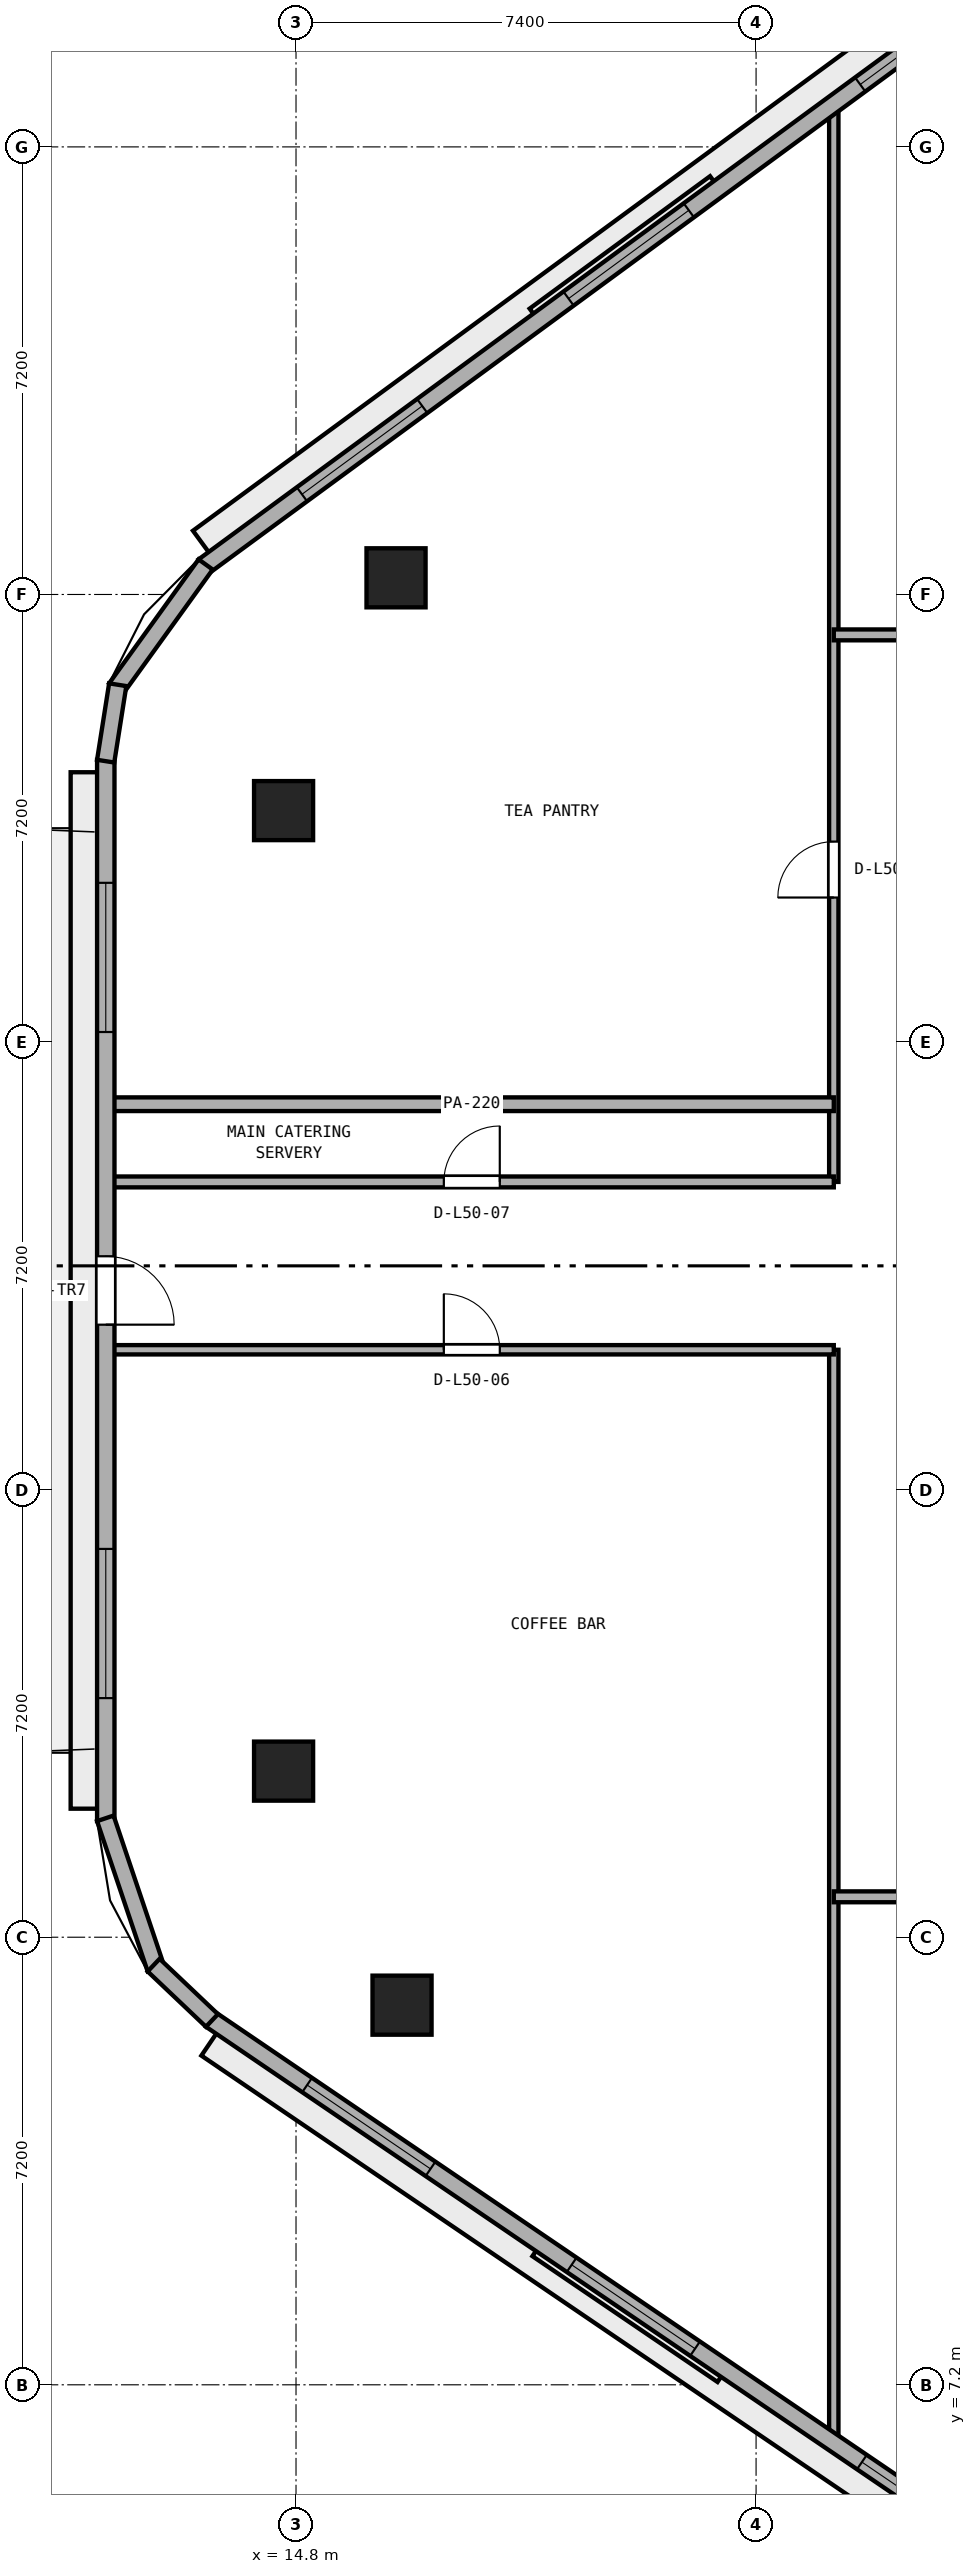
"""IFC4 building model, lengths in metres.
Left out: names, types, materials, properties, quantities, classifications, styles, units other than length and angle.
Written with IfcOpenShell. Run it as: python <this file> out.ifc"""

import sys

from ifc_helpers import new_model, si_unit, direction, frame, frame_2d, origin, origin_2d, place, context, subcontext, project, spatial, rectangle, extrude, element, fill, save


model = new_model("IFC4")
c1 = context("Model", 3, precision=1e-05, world=origin(), true_north=direction((0.0, 1.0)))
c2 = subcontext(c1, "Body", "Model", "MODEL_VIEW")
j1 = project(units=[si_unit("LENGTHUNIT", "METRE"), si_unit("PLANEANGLEUNIT", "RADIAN")], contexts=[c1])
p1 = place(None, origin())
s1 = spatial("IfcSite", under=j1, at=p1, CompositionType="ELEMENT")
p2 = place(p1, origin())
s2 = spatial("IfcBuilding", under=s1, at=p2, CompositionType="ELEMENT")
p3 = place(p2, frame((0.0, 0.0, 197.2)))
s3 = spatial("IfcBuildingStorey", under=s2, at=p3, CompositionType="ELEMENT", Elevation=197.2)
for number, where, z_axis, x_axis in (
    (1, (16.409, 36.268, 0.0), (0.0, 0.0, 1.0), (1.0, 0.0, 0.0)),
    (2, (14.6, 32.523, 0.0), (0.0, 0.0, 1.0), (1.0, 0.0, 0.0)),
    (3, (14.6, 17.072, 0.0), (0.0, 0.0, 1.0), (1.0, 0.0, 0.0)),
    (4, (16.505, 13.307, 0.0), (0.0, 0.0, 1.0), (1.0, 0.0, 0.0)),
):
    element("IfcColumn", number, at=place(p3, frame(where, z_axis=z_axis, x_axis=x_axis)), inside=s3, PredefinedType="COLUMN", context=c2, shape_type="SweptSolid", body=[
        extrude(rectangle(XDim=0.95, YDim=0.95, at=origin_2d()), origin(), (0.0, 0.0, 1.0), 3.8),
    ])
p4 = place(p3, frame((23.45, 6.235, 0.0), z_axis=(0.0, 0.0, 1.0), x_axis=(0.0, 1.0, 0.0)))
e5 = element("IfcWall", 5, at=p4, inside=s3, PredefinedType="PARTITIONING", context=c2, shape_type="SweptSolid", body=[
    extrude(rectangle(XDim=17.615, YDim=0.15, at=frame_2d((8.808, 0.0))), origin(), (0.0, 0.0, 1.0), 3.54),
])
p5 = place(p3, frame((23.45, 26.55, 0.0), z_axis=(0.0, 0.0, 1.0), x_axis=(0.0, 1.0, 0.0)))
e6 = element("IfcWall", 6, at=p5, inside=s3, PredefinedType="PARTITIONING", context=c2, shape_type="SweptSolid", body=[
    extrude(rectangle(XDim=17.375, YDim=0.15, at=frame_2d((8.688, 0.0))), origin(), (0.0, 0.0, 1.0), 3.54),
])
p6 = place(p5, frame((4.575, 0.0, 0.0)))
e7 = element("IfcOpeningElement", 7, at=p6, cuts=e6, PredefinedType="OPENING", context=c2, shape_type="SweptSolid", body=[
    extrude(rectangle(XDim=0.9, YDim=2.1, at=frame_2d((0.45, 1.05))), frame((0.0, 0.085, 0.0), z_axis=(0.0, -1.0, 0.0), x_axis=(1.0, 0.0, 0.0)), (0.0, 0.0, 1.0), 0.17),
])
p7 = place(p3, frame((23.45, 15.05, 0.0), z_axis=(0.0, 0.0, 1.0), x_axis=(1.0, 0.0, 0.0)))
e8 = element("IfcWall", 8, at=p7, inside=s3, PredefinedType="PARTITIONING", context=c2, shape_type="SweptSolid", body=[
    extrude(rectangle(XDim=27.1, YDim=0.175, at=frame_2d((13.55, 0.0))), origin(), (0.0, 0.0, 1.0), 3.54),
])
p8 = place(p7, frame((3.895, 0.0, 0.0)))
e9 = element("IfcOpeningElement", 9, at=p8, cuts=e8, PredefinedType="OPENING", context=c2, shape_type="SweptSolid", body=[
    extrude(rectangle(XDim=0.9, YDim=2.1, at=frame_2d((0.45, 1.05))), frame((0.0, 0.097, 0.0), z_axis=(0.0, -1.0, 0.0), x_axis=(1.0, 0.0, 0.0)), (0.0, 0.0, 1.0), 0.195),
])
p9 = place(p7, frame((13.75, 0.0, 0.0)))
e10 = element("IfcOpeningElement", 10, at=p9, cuts=e8, PredefinedType="OPENING", context=c2, shape_type="SweptSolid", body=[
    extrude(rectangle(XDim=0.9, YDim=2.1, at=frame_2d((0.45, 1.05))), frame((0.0, 0.097, 0.0), z_axis=(0.0, -1.0, 0.0), x_axis=(1.0, 0.0, 0.0)), (0.0, 0.0, 1.0), 0.195),
])
p10 = place(p7, frame((22.955, 0.0, 0.0)))
e11 = element("IfcOpeningElement", 11, at=p10, cuts=e8, PredefinedType="OPENING", context=c2, shape_type="SweptSolid", body=[
    extrude(rectangle(XDim=0.9, YDim=2.1, at=frame_2d((0.45, 1.05))), frame((0.0, 0.097, 0.0), z_axis=(0.0, -1.0, 0.0), x_axis=(1.0, 0.0, 0.0)), (0.0, 0.0, 1.0), 0.195),
])
p11 = place(p3, frame((11.805, 23.85, 0.0), z_axis=(0.0, 0.0, 1.0), x_axis=(1.0, 0.0, 0.0)))
e12 = element("IfcWall", 12, at=p11, inside=s3, PredefinedType="PARTITIONING", context=c2, shape_type="SweptSolid", body=[
    extrude(rectangle(XDim=11.645, YDim=0.15, at=frame_2d((5.823, 0.0))), origin(), (0.0, 0.0, 1.0), 3.54),
])
p12 = place(p11, frame((5.373, 0.0, 0.0)))
e13 = element("IfcOpeningElement", 13, at=p12, cuts=e12, PredefinedType="OPENING", context=c2, shape_type="SweptSolid", body=[
    extrude(rectangle(XDim=0.9, YDim=2.1, at=frame_2d((0.45, 1.05))), frame((0.0, 0.085, 0.0), z_axis=(0.0, -1.0, 0.0), x_axis=(1.0, 0.0, 0.0)), (0.0, 0.0, 1.0), 0.17),
])
p13 = place(p3, frame((11.805, 26.55, 0.0), z_axis=(0.0, 0.0, 1.0), x_axis=(1.0, 0.0, 0.0)))
e14 = element("IfcWall", 14, at=p13, inside=s3, PredefinedType="PARTITIONING", context=c2, shape_type="SweptSolid", body=[
    extrude(rectangle(XDim=11.645, YDim=0.175, at=frame_2d((5.823, 0.0))), origin(), (0.0, 0.0, 1.0), 3.54),
])
p14 = place(p13, frame((5.373, 0.0, 0.0)))
e15 = element("IfcOpeningElement", 15, at=p14, cuts=e14, PredefinedType="OPENING", context=c2, shape_type="SweptSolid", body=[
    extrude(rectangle(XDim=0.9, YDim=2.1, at=frame_2d((0.45, 1.05))), frame((0.0, 0.097, 0.0), z_axis=(0.0, -1.0, 0.0), x_axis=(1.0, 0.0, 0.0)), (0.0, 0.0, 1.0), 0.195),
])
p15 = place(p3, frame((11.805, 27.8, 0.0), z_axis=(0.0, 0.0, 1.0), x_axis=(1.0, 0.0, 0.0)))
e16 = element("IfcWall", 16, at=p15, inside=s3, PredefinedType="PARTITIONING", context=c2, shape_type="SweptSolid", body=[
    extrude(rectangle(XDim=11.645, YDim=0.22, at=frame_2d((5.823, 0.0))), origin(), (0.0, 0.0, 1.0), 3.54),
])
p16 = place(p3, frame((23.45, 35.35, 0.0), z_axis=(0.0, 0.0, 1.0), x_axis=(1.0, 0.0, 0.0)))
e17 = element("IfcWall", 17, at=p16, inside=s3, PredefinedType="PARTITIONING", context=c2, shape_type="SweptSolid", body=[
    extrude(rectangle(XDim=10.95, YDim=0.175, at=frame_2d((5.475, 0.0))), origin(), (0.0, 0.0, 1.0), 3.54),
])
p17 = place(p16, frame((3.295, 0.0, 0.0)))
e18 = element("IfcOpeningElement", 18, at=p17, cuts=e17, PredefinedType="OPENING", context=c2, shape_type="SweptSolid", body=[
    extrude(rectangle(XDim=1.0, YDim=2.12, at=frame_2d((0.5, 1.06))), frame((0.0, 0.097, 0.0), z_axis=(0.0, -1.0, 0.0), x_axis=(1.0, 0.0, 0.0)), (0.0, 0.0, 1.0), 0.195),
])
p18 = place(p16, frame((8.53, 0.0, 0.0)))
e19 = element("IfcOpeningElement", 19, at=p18, cuts=e17, PredefinedType="OPENING", context=c2, shape_type="SweptSolid", body=[
    extrude(rectangle(XDim=1.0, YDim=2.12, at=frame_2d((0.5, 1.06))), frame((0.0, 0.097, 0.0), z_axis=(0.0, -1.0, 0.0), x_axis=(1.0, 0.0, 0.0)), (0.0, 0.0, 1.0), 0.195),
])
p19 = place(p3, frame((26.986, 46.488, 0.0), z_axis=(0.0, 0.0, 1.0), x_axis=(-0.806097783211, -0.59178236194, 0.0)))
e20 = element("IfcWall", 20, at=p19, inside=s3, PredefinedType="STANDARD", context=c2, shape_type="SweptSolid", body=[
    extrude(rectangle(XDim=16.959, YDim=0.28, at=frame_2d((8.479, 0.0))), origin(), (0.0, 0.0, 1.0), 3.54),
])
p20 = place(p19, frame((1.46, 0.0, 0.9)))
e21 = element("IfcOpeningElement", 21, at=p20, cuts=e20, PredefinedType="OPENING", context=c2, shape_type="SweptSolid", body=[
    extrude(rectangle(XDim=2.4, YDim=1.75, at=frame_2d((1.2, 0.875))), frame((0.0, 0.15, 0.0), z_axis=(0.0, -1.0, 0.0), x_axis=(1.0, 0.0, 0.0)), (0.0, 0.0, 1.0), 0.3),
])
p21 = place(p19, frame((7.279, 0.0, 0.9)))
e22 = element("IfcOpeningElement", 22, at=p21, cuts=e20, PredefinedType="OPENING", context=c2, shape_type="SweptSolid", body=[
    extrude(rectangle(XDim=2.4, YDim=1.75, at=frame_2d((1.2, 0.875))), frame((0.0, 0.15, 0.0), z_axis=(0.0, -1.0, 0.0), x_axis=(1.0, 0.0, 0.0)), (0.0, 0.0, 1.0), 0.3),
])
p22 = place(p19, frame((12.599, 0.0, 0.9)))
e23 = element("IfcOpeningElement", 23, at=p22, cuts=e20, PredefinedType="OPENING", context=c2, shape_type="SweptSolid", body=[
    extrude(rectangle(XDim=2.4, YDim=1.75, at=frame_2d((1.2, 0.875))), frame((0.0, 0.15, 0.0), z_axis=(0.0, -1.0, 0.0), x_axis=(1.0, 0.0, 0.0)), (0.0, 0.0, 1.0), 0.3),
])
p23 = place(p3, frame((11.74, 33.34, 0.0), z_axis=(0.0, 0.0, 1.0), x_axis=(0.0, -1.0, 0.0)))
e24 = element("IfcWall", 24, at=p23, inside=s3, PredefinedType="STANDARD", context=c2, shape_type="SweptSolid", body=[
    extrude(rectangle(XDim=17.073, YDim=0.28, at=frame_2d((8.536, 0.0))), origin(), (0.0, 0.0, 1.0), 3.54),
])
p24 = place(p23, frame((7.986, 0.0, 0.0)))
e25 = element("IfcOpeningElement", 25, at=p24, cuts=e24, PredefinedType="OPENING", context=c2, shape_type="SweptSolid", body=[
    extrude(rectangle(XDim=1.1, YDim=2.2, at=frame_2d((0.55, 1.1))), frame((0.0, 0.15, 0.0), z_axis=(0.0, -1.0, 0.0), x_axis=(1.0, 0.0, 0.0)), (0.0, 0.0, 1.0), 0.3),
])
p25 = place(p23, frame((1.979, 0.0, 0.9)))
e26 = element("IfcOpeningElement", 26, at=p25, cuts=e24, PredefinedType="OPENING", context=c2, shape_type="SweptSolid", body=[
    extrude(rectangle(XDim=2.4, YDim=1.75, at=frame_2d((1.2, 0.875))), frame((0.0, 0.15, 0.0), z_axis=(0.0, -1.0, 0.0), x_axis=(1.0, 0.0, 0.0)), (0.0, 0.0, 1.0), 0.3),
])
p26 = place(p23, frame((12.694, 0.0, 0.9)))
e27 = element("IfcOpeningElement", 27, at=p26, cuts=e24, PredefinedType="OPENING", context=c2, shape_type="SweptSolid", body=[
    extrude(rectangle(XDim=2.4, YDim=1.75, at=frame_2d((1.2, 0.875))), frame((0.0, 0.15, 0.0), z_axis=(0.0, -1.0, 0.0), x_axis=(1.0, 0.0, 0.0)), (0.0, 0.0, 1.0), 0.3),
])
p27 = place(p3, frame((13.43, 13.075, 0.0), z_axis=(0.0, 0.0, 1.0), x_axis=(0.827025402003, -0.562164552815, 0.0)))
e28 = element("IfcWall", 28, at=p27, inside=s3, PredefinedType="STANDARD", context=c2, shape_type="SweptSolid", body=[
    extrude(rectangle(XDim=16.435, YDim=0.28, at=frame_2d((8.218, 0.0))), origin(), (0.0, 0.0, 1.0), 3.54),
])
p28 = place(p27, frame((1.873, 0.0, 0.9)))
e29 = element("IfcOpeningElement", 29, at=p28, cuts=e28, PredefinedType="OPENING", context=c2, shape_type="SweptSolid", body=[
    extrude(rectangle(XDim=2.4, YDim=1.75, at=frame_2d((1.2, 0.875))), frame((0.0, 0.15, 0.0), z_axis=(0.0, -1.0, 0.0), x_axis=(1.0, 0.0, 0.0)), (0.0, 0.0, 1.0), 0.3),
])
p29 = place(p27, frame((7.018, 0.0, 0.9)))
e30 = element("IfcOpeningElement", 30, at=p29, cuts=e28, PredefinedType="OPENING", context=c2, shape_type="SweptSolid", body=[
    extrude(rectangle(XDim=2.4, YDim=1.75, at=frame_2d((1.2, 0.875))), frame((0.0, 0.15, 0.0), z_axis=(0.0, -1.0, 0.0), x_axis=(1.0, 0.0, 0.0)), (0.0, 0.0, 1.0), 0.3),
])
p30 = place(p27, frame((12.663, 0.0, 0.9)))
e31 = element("IfcOpeningElement", 31, at=p30, cuts=e28, PredefinedType="OPENING", context=c2, shape_type="SweptSolid", body=[
    extrude(rectangle(XDim=2.4, YDim=1.75, at=frame_2d((1.2, 0.875))), frame((0.0, 0.15, 0.0), z_axis=(0.0, -1.0, 0.0), x_axis=(1.0, 0.0, 0.0)), (0.0, 0.0, 1.0), 0.3),
])
p31 = place(p3, frame((13.346, 36.483, 0.0), z_axis=(0.0, 0.0, 1.0), x_axis=(-0.585128091556, -0.810940883463, 0.0)))
e32 = element("IfcWall", 32, at=p31, inside=s3, PredefinedType="STANDARD", context=c2, shape_type="SweptSolid", body=[
    extrude(rectangle(XDim=2.46, YDim=0.28, at=frame_2d((1.23, 0.0))), origin(), (0.0, 0.0, 1.0), 3.54),
])
p32 = place(p3, frame((11.932, 34.548, 0.0), z_axis=(0.0, 0.0, 1.0), x_axis=(-0.155519443181, -0.987832831401, 0.0)))
e33 = element("IfcWall", 33, at=p32, inside=s3, PredefinedType="STANDARD", context=c2, shape_type="SweptSolid", body=[
    extrude(rectangle(XDim=1.245, YDim=0.28, at=frame_2d((0.623, 0.0))), origin(), (0.0, 0.0, 1.0), 3.54),
])
p33 = place(p3, frame((11.733, 16.312, 0.0), z_axis=(0.0, 0.0, 1.0), x_axis=(0.318924860995, -0.947780002447, 0.0)))
e34 = element("IfcWall", 34, at=p33, inside=s3, PredefinedType="STANDARD", context=c2, shape_type="SweptSolid", body=[
    extrude(rectangle(XDim=2.552, YDim=0.28, at=frame_2d((1.276, 0.0))), origin(), (0.0, 0.0, 1.0), 3.54),
])
p34 = place(p3, frame((12.51, 13.951, 0.0), z_axis=(0.0, 0.0, 1.0), x_axis=(0.725371815671, -0.688357268451, 0.0)))
e35 = element("IfcWall", 35, at=p34, inside=s3, PredefinedType="STANDARD", context=c2, shape_type="SweptSolid", body=[
    extrude(rectangle(XDim=1.293, YDim=0.28, at=frame_2d((0.646, 0.0))), origin(), (0.0, 0.0, 1.0), 3.54),
])
p35 = place(p12, origin())
e36 = element("IfcDoor", 36, at=p35, inside=s3, OperationType="SINGLE_SWING_LEFT", PredefinedType="DOOR", context=c2, shape_type="SweptSolid", body=[
    extrude(rectangle(XDim=0.9, YDim=2.1, at=frame_2d((0.45, 1.05))), frame((0.0, 0.025, 0.0), z_axis=(0.0, -1.0, 0.0), x_axis=(1.0, 0.0, 0.0)), (0.0, 0.0, 1.0), 0.05),
])
fill(e13, e36)
p36 = place(p14, origin())
e37 = element("IfcDoor", 37, at=p36, inside=s3, OperationType="SINGLE_SWING_RIGHT", PredefinedType="DOOR", context=c2, shape_type="SweptSolid", body=[
    extrude(rectangle(XDim=0.9, YDim=2.1, at=frame_2d((0.45, 1.05))), frame((0.0, 0.025, 0.0), z_axis=(0.0, -1.0, 0.0), x_axis=(1.0, 0.0, 0.0)), (0.0, 0.0, 1.0), 0.05),
])
fill(e15, e37)
p37 = place(p6, origin())
e38 = element("IfcDoor", 38, at=p37, inside=s3, OperationType="SINGLE_SWING_LEFT", PredefinedType="DOOR", context=c2, shape_type="SweptSolid", body=[
    extrude(rectangle(XDim=0.9, YDim=2.1, at=frame_2d((0.45, 1.05))), frame((0.0, 0.025, 0.0), z_axis=(0.0, -1.0, 0.0), x_axis=(1.0, 0.0, 0.0)), (0.0, 0.0, 1.0), 0.05),
])
fill(e7, e38)
p38 = place(p20, origin())
e39 = element("IfcWindow", 39, at=p38, inside=s3, PartitioningType="SINGLE_PANEL", PredefinedType="WINDOW", context=c2, shape_type="SweptSolid", body=[
    extrude(rectangle(XDim=2.4, YDim=1.75, at=frame_2d((1.2, 0.875))), frame((0.0, 0.03, 0.0), z_axis=(0.0, -1.0, 0.0), x_axis=(1.0, 0.0, 0.0)), (0.0, 0.0, 1.0), 0.06),
])
fill(e21, e39)
p39 = place(p21, origin())
e40 = element("IfcWindow", 40, at=p39, inside=s3, PartitioningType="SINGLE_PANEL", PredefinedType="WINDOW", context=c2, shape_type="SweptSolid", body=[
    extrude(rectangle(XDim=2.4, YDim=1.75, at=frame_2d((1.2, 0.875))), frame((0.0, 0.03, 0.0), z_axis=(0.0, -1.0, 0.0), x_axis=(1.0, 0.0, 0.0)), (0.0, 0.0, 1.0), 0.06),
])
fill(e22, e40)
p40 = place(p22, origin())
e41 = element("IfcWindow", 41, at=p40, inside=s3, PartitioningType="SINGLE_PANEL", PredefinedType="WINDOW", context=c2, shape_type="SweptSolid", body=[
    extrude(rectangle(XDim=2.4, YDim=1.75, at=frame_2d((1.2, 0.875))), frame((0.0, 0.03, 0.0), z_axis=(0.0, -1.0, 0.0), x_axis=(1.0, 0.0, 0.0)), (0.0, 0.0, 1.0), 0.06),
])
fill(e23, e41)
p41 = place(p24, origin())
e42 = element("IfcDoor", 42, at=p41, inside=s3, OperationType="SINGLE_SWING_RIGHT", PredefinedType="DOOR", context=c2, shape_type="SweptSolid", body=[
    extrude(rectangle(XDim=1.1, YDim=2.2, at=frame_2d((0.55, 1.1))), frame((0.0, 0.025, 0.0), z_axis=(0.0, -1.0, 0.0), x_axis=(1.0, 0.0, 0.0)), (0.0, 0.0, 1.0), 0.05),
])
fill(e25, e42)
p42 = place(p25, origin())
e43 = element("IfcWindow", 43, at=p42, inside=s3, PartitioningType="SINGLE_PANEL", PredefinedType="WINDOW", context=c2, shape_type="SweptSolid", body=[
    extrude(rectangle(XDim=2.4, YDim=1.75, at=frame_2d((1.2, 0.875))), frame((0.0, 0.03, 0.0), z_axis=(0.0, -1.0, 0.0), x_axis=(1.0, 0.0, 0.0)), (0.0, 0.0, 1.0), 0.06),
])
fill(e26, e43)
p43 = place(p26, origin())
e44 = element("IfcWindow", 44, at=p43, inside=s3, PartitioningType="SINGLE_PANEL", PredefinedType="WINDOW", context=c2, shape_type="SweptSolid", body=[
    extrude(rectangle(XDim=2.4, YDim=1.75, at=frame_2d((1.2, 0.875))), frame((0.0, 0.03, 0.0), z_axis=(0.0, -1.0, 0.0), x_axis=(1.0, 0.0, 0.0)), (0.0, 0.0, 1.0), 0.06),
])
fill(e27, e44)
p44 = place(p28, origin())
e45 = element("IfcWindow", 45, at=p44, inside=s3, PartitioningType="SINGLE_PANEL", PredefinedType="WINDOW", context=c2, shape_type="SweptSolid", body=[
    extrude(rectangle(XDim=2.4, YDim=1.75, at=frame_2d((1.2, 0.875))), frame((0.0, 0.03, 0.0), z_axis=(0.0, -1.0, 0.0), x_axis=(1.0, 0.0, 0.0)), (0.0, 0.0, 1.0), 0.06),
])
fill(e29, e45)
p45 = place(p29, origin())
e46 = element("IfcWindow", 46, at=p45, inside=s3, PartitioningType="SINGLE_PANEL", PredefinedType="WINDOW", context=c2, shape_type="SweptSolid", body=[
    extrude(rectangle(XDim=2.4, YDim=1.75, at=frame_2d((1.2, 0.875))), frame((0.0, 0.03, 0.0), z_axis=(0.0, -1.0, 0.0), x_axis=(1.0, 0.0, 0.0)), (0.0, 0.0, 1.0), 0.06),
])
fill(e30, e46)
p46 = place(p30, origin())
e47 = element("IfcWindow", 47, at=p46, inside=s3, PartitioningType="SINGLE_PANEL", PredefinedType="WINDOW", context=c2, shape_type="SweptSolid", body=[
    extrude(rectangle(XDim=2.4, YDim=1.75, at=frame_2d((1.2, 0.875))), frame((0.0, 0.03, 0.0), z_axis=(0.0, -1.0, 0.0), x_axis=(1.0, 0.0, 0.0)), (0.0, 0.0, 1.0), 0.06),
])
fill(e31, e47)
save(model, sys.argv[1])
